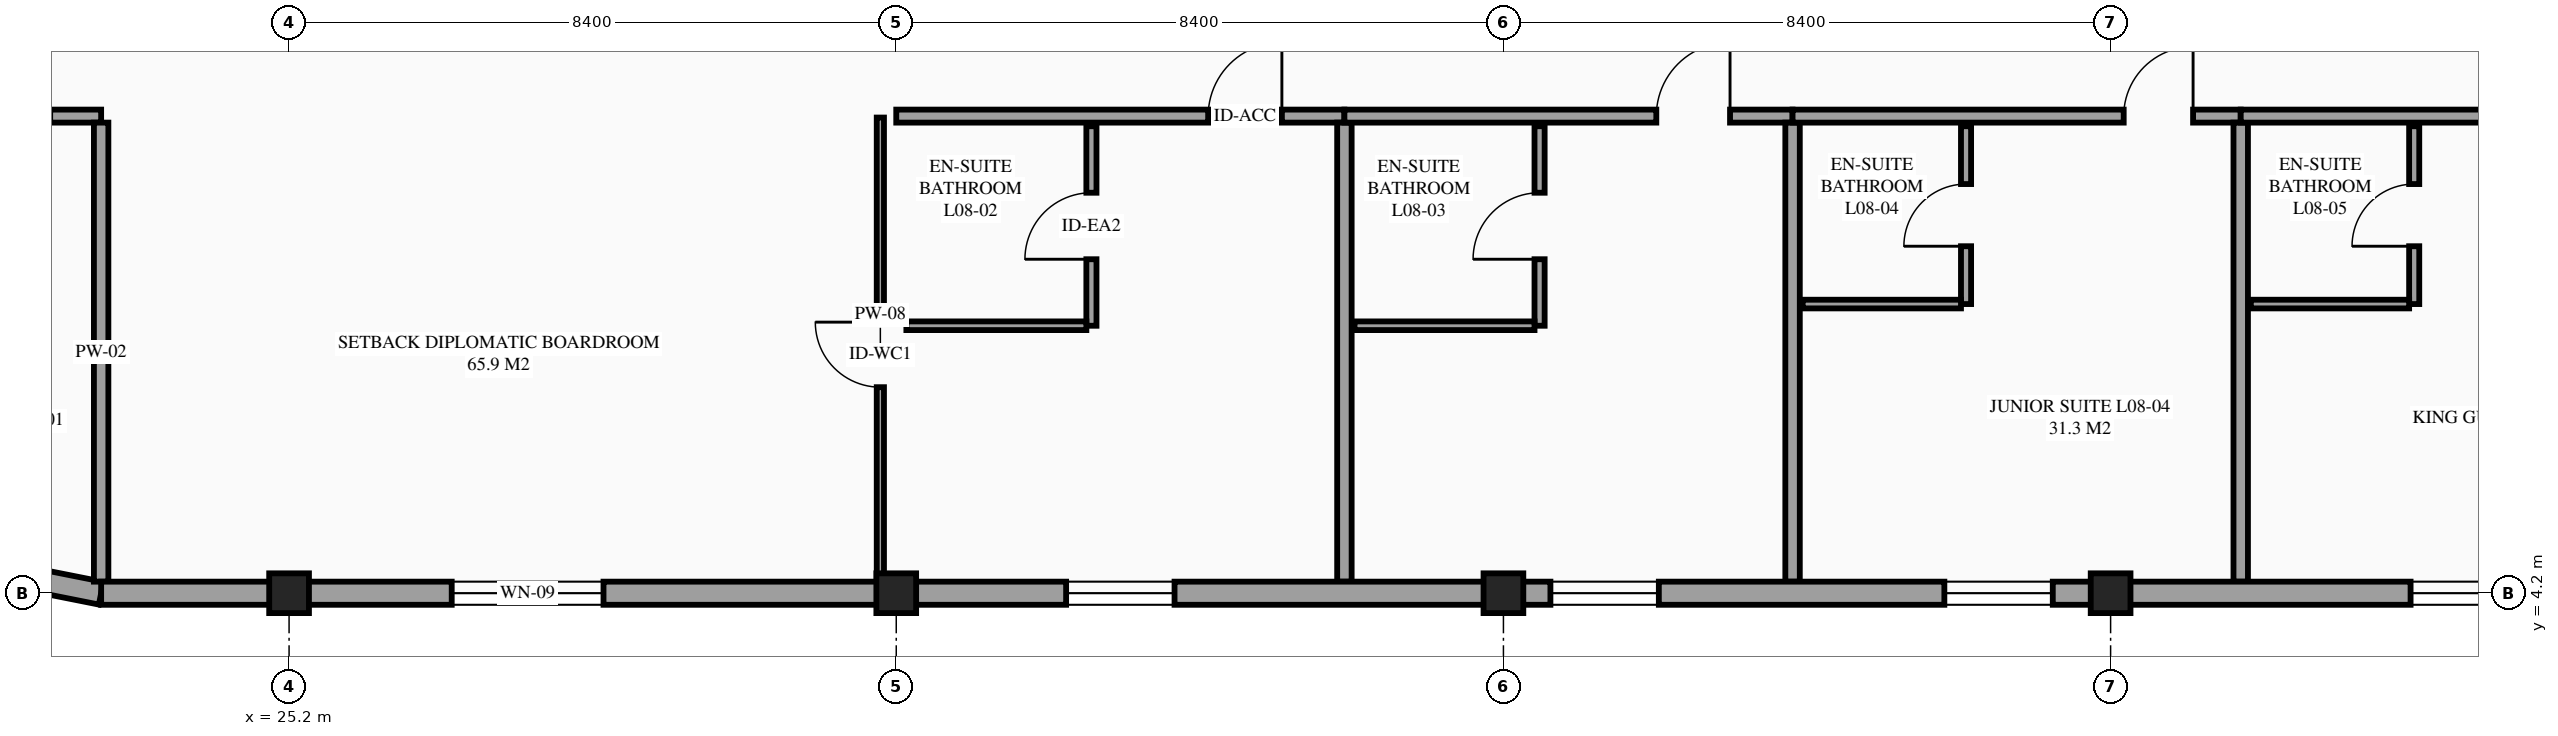
"""IFC4 building model, lengths in metres.
Left out: names, types, materials, properties, quantities, classifications, styles, units other than length and angle.
Written with IfcOpenShell. Run it as: python <this file> out.ifc"""

import sys

from ifc_helpers import new_model, si_unit, direction, frame, frame_2d, origin, origin_2d, place, context, subcontext, project, spatial, rectangle, extrude, element, fill, save


model = new_model("IFC4")
c1 = context("Model", 3, precision=1e-05, world=origin(), true_north=direction((0.0, 1.0)))
c2 = subcontext(c1, "Body", "Model", "MODEL_VIEW")
j1 = project(units=[si_unit("LENGTHUNIT", "METRE"), si_unit("PLANEANGLEUNIT", "RADIAN")], contexts=[c1])
p1 = place(None, origin())
s1 = spatial("IfcSite", under=j1, at=p1, CompositionType="ELEMENT")
p2 = place(p1, origin())
s2 = spatial("IfcBuilding", under=s1, at=p2, CompositionType="ELEMENT")
p3 = place(p2, frame((0.0, 0.0, 32.7)))
s3 = spatial("IfcBuildingStorey", under=s2, at=p3, CompositionType="ELEMENT", Elevation=32.7)
for number, where, z_axis, x_axis in (
    (1, (25.2, 4.2, 0.0), (0.0, 0.0, 1.0), (1.0, 0.0, 0.0)),
    (2, (33.6, 4.2, 0.0), (0.0, 0.0, 1.0), (1.0, 0.0, 0.0)),
    (3, (42.0, 4.2, 0.0), (0.0, 0.0, 1.0), (1.0, 0.0, 0.0)),
    (4, (50.4, 4.2, 0.0), (0.0, 0.0, 1.0), (1.0, 0.0, 0.0)),
):
    element("IfcColumn", number, at=place(p3, frame(where, z_axis=z_axis, x_axis=x_axis)), inside=s3, PredefinedType="COLUMN", context=c2, shape_type="SweptSolid", body=[
        extrude(rectangle(XDim=0.55, YDim=0.55, at=origin_2d()), origin(), (0.0, 0.0, 1.0), 3.6),
    ])
p4 = place(p3, frame((20.38, 4.642, 0.0), z_axis=(0.0, 0.0, 1.0), x_axis=(0.98077519094, -0.195141038321, 0.0)))
e5 = element("IfcWall", 5, at=p4, inside=s3, PredefinedType="STANDARD", context=c2, shape_type="SweptSolid", body=[
    extrude(rectangle(XDim=2.263, YDim=0.32, at=frame_2d((1.132, 0.0))), origin(), (0.0, 0.0, 1.0), 2.88),
])
p5 = place(p3, frame((16.96, 10.8, 0.0), z_axis=(0.0, 0.0, 1.0), x_axis=(1.0, 0.0, 0.0)))
e6 = element("IfcWall", 6, at=p5, inside=s3, PredefinedType="PARTITIONING", context=c2, shape_type="SweptSolid", body=[
    extrude(rectangle(XDim=5.64, YDim=0.18, at=frame_2d((2.82, 0.0))), origin(), (0.0, 0.0, 1.0), 3.375),
])
p6 = place(p5, frame((3.975, 0.0, 0.0)))
e7 = element("IfcOpeningElement", 7, at=p6, cuts=e6, PredefinedType="OPENING", context=c2, shape_type="SweptSolid", body=[
    extrude(rectangle(XDim=0.96, YDim=2.15, at=frame_2d((0.48, 1.075))), frame((0.0, 0.1, 0.0), z_axis=(0.0, -1.0, 0.0), x_axis=(1.0, 0.0, 0.0)), (0.0, 0.0, 1.0), 0.2),
])
p7 = place(p3, frame((22.6, 4.36, 0.0), z_axis=(0.0, 0.0, 1.0), x_axis=(0.0, 1.0, 0.0)))
e8 = element("IfcWall", 8, at=p7, inside=s3, PredefinedType="PARTITIONING", context=c2, shape_type="SweptSolid", body=[
    extrude(rectangle(XDim=6.35, YDim=0.2, at=frame_2d((3.175, 0.0))), origin(), (0.0, 0.0, 1.0), 3.375),
])
p8 = place(p3, frame((33.6, 10.8, 0.0), z_axis=(0.0, 0.0, 1.0), x_axis=(1.0, 0.0, 0.0)))
e9 = element("IfcWall", 9, at=p8, inside=s3, PredefinedType="PARTITIONING", context=c2, shape_type="SweptSolid", body=[
    extrude(rectangle(XDim=6.2, YDim=0.18, at=frame_2d((3.1, 0.0))), origin(), (0.0, 0.0, 1.0), 3.375),
])
p9 = place(p8, frame((4.315, 0.0, 0.0)))
e10 = element("IfcOpeningElement", 10, at=p9, cuts=e9, PredefinedType="OPENING", context=c2, shape_type="SweptSolid", body=[
    extrude(rectangle(XDim=1.02, YDim=2.15, at=frame_2d((0.51, 1.075))), frame((0.0, 0.1, 0.0), z_axis=(0.0, -1.0, 0.0), x_axis=(1.0, 0.0, 0.0)), (0.0, 0.0, 1.0), 0.2),
])
p10 = place(p3, frame((39.8, 4.36, 0.0), z_axis=(0.0, 0.0, 1.0), x_axis=(0.0, 1.0, 0.0)))
e11 = element("IfcWall", 11, at=p10, inside=s3, PredefinedType="PARTITIONING", context=c2, shape_type="SweptSolid", body=[
    extrude(rectangle(XDim=6.35, YDim=0.2, at=frame_2d((3.175, 0.0))), origin(), (0.0, 0.0, 1.0), 3.375),
])
p11 = place(p3, frame((36.3, 7.9, 0.0), z_axis=(0.0, 0.0, 1.0), x_axis=(0.0, 1.0, 0.0)))
e12 = element("IfcWall", 12, at=p11, inside=s3, PredefinedType="PARTITIONING", context=c2, shape_type="SweptSolid", body=[
    extrude(rectangle(XDim=2.76, YDim=0.14, at=frame_2d((1.38, 0.0))), origin(), (0.0, 0.0, 1.0), 3.375),
])
p12 = place(p11, frame((0.92, 0.0, 0.0)))
e13 = element("IfcOpeningElement", 13, at=p12, cuts=e12, PredefinedType="OPENING", context=c2, shape_type="SweptSolid", body=[
    extrude(rectangle(XDim=0.92, YDim=2.1, at=frame_2d((0.46, 1.05))), frame((0.0, 0.08, 0.0), z_axis=(0.0, -1.0, 0.0), x_axis=(1.0, 0.0, 0.0)), (0.0, 0.0, 1.0), 0.16),
])
p13 = place(p3, frame((33.74, 7.9, 0.0), z_axis=(0.0, 0.0, 1.0), x_axis=(1.0, 0.0, 0.0)))
e14 = element("IfcWall", 14, at=p13, inside=s3, PredefinedType="PARTITIONING", context=c2, shape_type="SweptSolid", body=[
    extrude(rectangle(XDim=2.49, YDim=0.12, at=frame_2d((1.245, 0.0))), origin(), (0.0, 0.0, 1.0), 3.375),
])
p14 = place(p3, frame((39.8, 10.8, 0.0), z_axis=(0.0, 0.0, 1.0), x_axis=(1.0, 0.0, 0.0)))
e15 = element("IfcWall", 15, at=p14, inside=s3, PredefinedType="PARTITIONING", context=c2, shape_type="SweptSolid", body=[
    extrude(rectangle(XDim=6.2, YDim=0.18, at=frame_2d((3.1, 0.0))), origin(), (0.0, 0.0, 1.0), 3.375),
])
p15 = place(p14, frame((4.315, 0.0, 0.0)))
e16 = element("IfcOpeningElement", 16, at=p15, cuts=e15, PredefinedType="OPENING", context=c2, shape_type="SweptSolid", body=[
    extrude(rectangle(XDim=1.02, YDim=2.15, at=frame_2d((0.51, 1.075))), frame((0.0, 0.1, 0.0), z_axis=(0.0, -1.0, 0.0), x_axis=(1.0, 0.0, 0.0)), (0.0, 0.0, 1.0), 0.2),
])
p16 = place(p3, frame((46.0, 4.36, 0.0), z_axis=(0.0, 0.0, 1.0), x_axis=(0.0, 1.0, 0.0)))
e17 = element("IfcWall", 17, at=p16, inside=s3, PredefinedType="PARTITIONING", context=c2, shape_type="SweptSolid", body=[
    extrude(rectangle(XDim=6.35, YDim=0.2, at=frame_2d((3.175, 0.0))), origin(), (0.0, 0.0, 1.0), 3.375),
])
p17 = place(p3, frame((42.5, 7.9, 0.0), z_axis=(0.0, 0.0, 1.0), x_axis=(0.0, 1.0, 0.0)))
e18 = element("IfcWall", 18, at=p17, inside=s3, PredefinedType="PARTITIONING", context=c2, shape_type="SweptSolid", body=[
    extrude(rectangle(XDim=2.76, YDim=0.14, at=frame_2d((1.38, 0.0))), origin(), (0.0, 0.0, 1.0), 3.375),
])
p18 = place(p17, frame((0.92, 0.0, 0.0)))
e19 = element("IfcOpeningElement", 19, at=p18, cuts=e18, PredefinedType="OPENING", context=c2, shape_type="SweptSolid", body=[
    extrude(rectangle(XDim=0.92, YDim=2.1, at=frame_2d((0.46, 1.05))), frame((0.0, 0.08, 0.0), z_axis=(0.0, -1.0, 0.0), x_axis=(1.0, 0.0, 0.0)), (0.0, 0.0, 1.0), 0.16),
])
p19 = place(p3, frame((39.94, 7.9, 0.0), z_axis=(0.0, 0.0, 1.0), x_axis=(1.0, 0.0, 0.0)))
e20 = element("IfcWall", 20, at=p19, inside=s3, PredefinedType="PARTITIONING", context=c2, shape_type="SweptSolid", body=[
    extrude(rectangle(XDim=2.49, YDim=0.12, at=frame_2d((1.245, 0.0))), origin(), (0.0, 0.0, 1.0), 3.375),
])
p20 = place(p3, frame((46.0, 10.8, 0.0), z_axis=(0.0, 0.0, 1.0), x_axis=(1.0, 0.0, 0.0)))
e21 = element("IfcWall", 21, at=p20, inside=s3, PredefinedType="PARTITIONING", context=c2, shape_type="SweptSolid", body=[
    extrude(rectangle(XDim=6.2, YDim=0.18, at=frame_2d((3.1, 0.0))), origin(), (0.0, 0.0, 1.0), 3.375),
])
p21 = place(p20, frame((4.581, 0.0, 0.0)))
e22 = element("IfcOpeningElement", 22, at=p21, cuts=e21, PredefinedType="OPENING", context=c2, shape_type="SweptSolid", body=[
    extrude(rectangle(XDim=0.96, YDim=2.15, at=frame_2d((0.48, 1.075))), frame((0.0, 0.1, 0.0), z_axis=(0.0, -1.0, 0.0), x_axis=(1.0, 0.0, 0.0)), (0.0, 0.0, 1.0), 0.2),
])
p22 = place(p3, frame((52.2, 4.36, 0.0), z_axis=(0.0, 0.0, 1.0), x_axis=(0.0, 1.0, 0.0)))
e23 = element("IfcWall", 23, at=p22, inside=s3, PredefinedType="PARTITIONING", context=c2, shape_type="SweptSolid", body=[
    extrude(rectangle(XDim=6.35, YDim=0.2, at=frame_2d((3.175, 0.0))), origin(), (0.0, 0.0, 1.0), 3.375),
])
p23 = place(p3, frame((48.4, 8.2, 0.0), z_axis=(0.0, 0.0, 1.0), x_axis=(0.0, 1.0, 0.0)))
e24 = element("IfcWall", 24, at=p23, inside=s3, PredefinedType="PARTITIONING", context=c2, shape_type="SweptSolid", body=[
    extrude(rectangle(XDim=2.46, YDim=0.14, at=frame_2d((1.23, 0.0))), origin(), (0.0, 0.0, 1.0), 3.375),
])
p24 = place(p23, frame((0.8, 0.0, 0.0)))
e25 = element("IfcOpeningElement", 25, at=p24, cuts=e24, PredefinedType="OPENING", context=c2, shape_type="SweptSolid", body=[
    extrude(rectangle(XDim=0.86, YDim=2.1, at=frame_2d((0.43, 1.05))), frame((0.0, 0.08, 0.0), z_axis=(0.0, -1.0, 0.0), x_axis=(1.0, 0.0, 0.0)), (0.0, 0.0, 1.0), 0.16),
])
p25 = place(p3, frame((46.14, 8.2, 0.0), z_axis=(0.0, 0.0, 1.0), x_axis=(1.0, 0.0, 0.0)))
e26 = element("IfcWall", 26, at=p25, inside=s3, PredefinedType="PARTITIONING", context=c2, shape_type="SweptSolid", body=[
    extrude(rectangle(XDim=2.19, YDim=0.12, at=frame_2d((1.095, 0.0))), origin(), (0.0, 0.0, 1.0), 3.375),
])
p26 = place(p3, frame((52.2, 10.8, 0.0), z_axis=(0.0, 0.0, 1.0), x_axis=(1.0, 0.0, 0.0)))
e27 = element("IfcWall", 27, at=p26, inside=s3, PredefinedType="PARTITIONING", context=c2, shape_type="SweptSolid", body=[
    extrude(rectangle(XDim=6.2, YDim=0.18, at=frame_2d((3.1, 0.0))), origin(), (0.0, 0.0, 1.0), 3.375),
])
p27 = place(p26, frame((4.231, 0.0, 0.0)))
e28 = element("IfcOpeningElement", 28, at=p27, cuts=e27, PredefinedType="OPENING", context=c2, shape_type="SweptSolid", body=[
    extrude(rectangle(XDim=0.96, YDim=2.15, at=frame_2d((0.48, 1.075))), frame((0.0, 0.1, 0.0), z_axis=(0.0, -1.0, 0.0), x_axis=(1.0, 0.0, 0.0)), (0.0, 0.0, 1.0), 0.2),
])
p28 = place(p3, frame((54.6, 8.2, 0.0), z_axis=(0.0, 0.0, 1.0), x_axis=(0.0, 1.0, 0.0)))
e29 = element("IfcWall", 29, at=p28, inside=s3, PredefinedType="PARTITIONING", context=c2, shape_type="SweptSolid", body=[
    extrude(rectangle(XDim=2.46, YDim=0.14, at=frame_2d((1.23, 0.0))), origin(), (0.0, 0.0, 1.0), 3.375),
])
p29 = place(p28, frame((0.8, 0.0, 0.0)))
e30 = element("IfcOpeningElement", 30, at=p29, cuts=e29, PredefinedType="OPENING", context=c2, shape_type="SweptSolid", body=[
    extrude(rectangle(XDim=0.86, YDim=2.1, at=frame_2d((0.43, 1.05))), frame((0.0, 0.08, 0.0), z_axis=(0.0, -1.0, 0.0), x_axis=(1.0, 0.0, 0.0)), (0.0, 0.0, 1.0), 0.16),
])
p30 = place(p3, frame((52.34, 8.2, 0.0), z_axis=(0.0, 0.0, 1.0), x_axis=(1.0, 0.0, 0.0)))
e31 = element("IfcWall", 31, at=p30, inside=s3, PredefinedType="PARTITIONING", context=c2, shape_type="SweptSolid", body=[
    extrude(rectangle(XDim=2.19, YDim=0.12, at=frame_2d((1.095, 0.0))), origin(), (0.0, 0.0, 1.0), 3.375),
])
p31 = place(p3, frame((33.38, 4.22, 0.0), z_axis=(0.0, 0.0, 1.0), x_axis=(0.0, 1.0, 0.0)))
e32 = element("IfcWall", 32, at=p31, inside=s3, PredefinedType="PARTITIONING", context=c2, shape_type="SweptSolid", body=[
    extrude(rectangle(XDim=6.56, YDim=0.1, at=frame_2d((3.28, 0.0))), origin(), (0.0, 0.0, 1.0), 2.58),
])
p32 = place(p31, frame((2.83, 0.0, 0.0)))
e33 = element("IfcOpeningElement", 33, at=p32, cuts=e32, PredefinedType="OPENING", context=c2, shape_type="SweptSolid", body=[
    extrude(rectangle(XDim=0.9, YDim=2.12, at=frame_2d((0.45, 1.06))), frame((0.0, 0.06, 0.0), z_axis=(0.0, -1.0, 0.0), x_axis=(1.0, 0.0, 0.0)), (0.0, 0.0, 1.0), 0.12),
])
p33 = place(p3, frame((22.6, 4.2, 0.0), z_axis=(0.0, 0.0, 1.0), x_axis=(1.0, 0.0, 0.0)))
e34 = element("IfcWall", 34, at=p33, inside=s3, PredefinedType="STANDARD", context=c2, shape_type="SweptSolid", body=[
    extrude(rectangle(XDim=2.6, YDim=0.32, at=frame_2d((1.3, 0.0))), origin(), (0.0, 0.0, 1.0), 2.88),
])
p34 = place(p3, frame((25.2, 4.2, 0.0), z_axis=(0.0, 0.0, 1.0), x_axis=(1.0, 0.0, 0.0)))
e35 = element("IfcWall", 35, at=p34, inside=s3, PredefinedType="STANDARD", context=c2, shape_type="SweptSolid", body=[
    extrude(rectangle(XDim=8.4, YDim=0.32, at=frame_2d((4.2, 0.0))), origin(), (0.0, 0.0, 1.0), 2.63),
])
p35 = place(p34, frame((2.25, 0.0, 0.75)))
e36 = element("IfcOpeningElement", 36, at=p35, cuts=e35, PredefinedType="OPENING", context=c2, shape_type="SweptSolid", body=[
    extrude(rectangle(XDim=2.1, YDim=1.5, at=frame_2d((1.05, 0.75))), frame((0.0, 0.17, 0.0), z_axis=(0.0, -1.0, 0.0), x_axis=(1.0, 0.0, 0.0)), (0.0, 0.0, 1.0), 0.34),
])
p36 = place(p3, frame((33.6, 4.2, 0.0), z_axis=(0.0, 0.0, 1.0), x_axis=(1.0, 0.0, 0.0)))
e37 = element("IfcWall", 37, at=p36, inside=s3, PredefinedType="STANDARD", context=c2, shape_type="SweptSolid", body=[
    extrude(rectangle(XDim=8.4, YDim=0.32, at=frame_2d((4.2, 0.0))), origin(), (0.0, 0.0, 1.0), 2.73),
])
p37 = place(p36, frame((2.35, 0.0, 0.85)))
e38 = element("IfcOpeningElement", 38, at=p37, cuts=e37, PredefinedType="OPENING", context=c2, shape_type="SweptSolid", body=[
    extrude(rectangle(XDim=1.5, YDim=1.5, at=frame_2d((0.75, 0.75))), frame((0.0, 0.17, 0.0), z_axis=(0.0, -1.0, 0.0), x_axis=(1.0, 0.0, 0.0)), (0.0, 0.0, 1.0), 0.34),
])
p38 = place(p3, frame((42.0, 4.2, 0.0), z_axis=(0.0, 0.0, 1.0), x_axis=(1.0, 0.0, 0.0)))
e39 = element("IfcWall", 39, at=p38, inside=s3, PredefinedType="STANDARD", context=c2, shape_type="SweptSolid", body=[
    extrude(rectangle(XDim=8.4, YDim=0.32, at=frame_2d((4.2, 0.0))), origin(), (0.0, 0.0, 1.0), 3.075),
])
p39 = place(p38, frame((0.65, 0.0, 0.85)))
e40 = element("IfcOpeningElement", 40, at=p39, cuts=e39, PredefinedType="OPENING", context=c2, shape_type="SweptSolid", body=[
    extrude(rectangle(XDim=1.5, YDim=1.5, at=frame_2d((0.75, 0.75))), frame((0.0, 0.17, 0.0), z_axis=(0.0, -1.0, 0.0), x_axis=(1.0, 0.0, 0.0)), (0.0, 0.0, 1.0), 0.34),
])
p40 = place(p38, frame((6.1, 0.0, 0.85)))
e41 = element("IfcOpeningElement", 41, at=p40, cuts=e39, PredefinedType="OPENING", context=c2, shape_type="SweptSolid", body=[
    extrude(rectangle(XDim=1.5, YDim=1.5, at=frame_2d((0.75, 0.75))), frame((0.0, 0.17, 0.0), z_axis=(0.0, -1.0, 0.0), x_axis=(1.0, 0.0, 0.0)), (0.0, 0.0, 1.0), 0.34),
])
p41 = place(p3, frame((50.4, 4.2, 0.0), z_axis=(0.0, 0.0, 1.0), x_axis=(1.0, 0.0, 0.0)))
e42 = element("IfcWall", 42, at=p41, inside=s3, PredefinedType="STANDARD", context=c2, shape_type="SweptSolid", body=[
    extrude(rectangle(XDim=8.4, YDim=0.32, at=frame_2d((4.2, 0.0))), origin(), (0.0, 0.0, 1.0), 2.78),
])
p42 = place(p41, frame((4.15, 0.0, 0.85)))
e43 = element("IfcOpeningElement", 43, at=p42, cuts=e42, PredefinedType="OPENING", context=c2, shape_type="SweptSolid", body=[
    extrude(rectangle(XDim=1.5, YDim=1.5, at=frame_2d((0.75, 0.75))), frame((0.0, 0.17, 0.0), z_axis=(0.0, -1.0, 0.0), x_axis=(1.0, 0.0, 0.0)), (0.0, 0.0, 1.0), 0.34),
])
p43 = place(p37, origin())
e44 = element("IfcWindow", 44, at=p43, inside=s3, PartitioningType="SINGLE_PANEL", PredefinedType="WINDOW", context=c2, shape_type="SweptSolid", body=[
    extrude(rectangle(XDim=1.5, YDim=1.5, at=frame_2d((0.75, 0.75))), frame((0.0, 0.03, 0.0), z_axis=(0.0, -1.0, 0.0), x_axis=(1.0, 0.0, 0.0)), (0.0, 0.0, 1.0), 0.06),
])
fill(e38, e44)
p44 = place(p39, origin())
e45 = element("IfcWindow", 45, at=p44, inside=s3, PartitioningType="SINGLE_PANEL", PredefinedType="WINDOW", context=c2, shape_type="SweptSolid", body=[
    extrude(rectangle(XDim=1.5, YDim=1.5, at=frame_2d((0.75, 0.75))), frame((0.0, 0.03, 0.0), z_axis=(0.0, -1.0, 0.0), x_axis=(1.0, 0.0, 0.0)), (0.0, 0.0, 1.0), 0.06),
])
fill(e40, e45)
p45 = place(p40, origin())
e46 = element("IfcWindow", 46, at=p45, inside=s3, PartitioningType="SINGLE_PANEL", PredefinedType="WINDOW", context=c2, shape_type="SweptSolid", body=[
    extrude(rectangle(XDim=1.5, YDim=1.5, at=frame_2d((0.75, 0.75))), frame((0.0, 0.03, 0.0), z_axis=(0.0, -1.0, 0.0), x_axis=(1.0, 0.0, 0.0)), (0.0, 0.0, 1.0), 0.06),
])
fill(e41, e46)
p46 = place(p42, origin())
e47 = element("IfcWindow", 47, at=p46, inside=s3, PartitioningType="SINGLE_PANEL", PredefinedType="WINDOW", context=c2, shape_type="SweptSolid", body=[
    extrude(rectangle(XDim=1.5, YDim=1.5, at=frame_2d((0.75, 0.75))), frame((0.0, 0.03, 0.0), z_axis=(0.0, -1.0, 0.0), x_axis=(1.0, 0.0, 0.0)), (0.0, 0.0, 1.0), 0.06),
])
fill(e43, e47)
p47 = place(p35, origin())
e48 = element("IfcWindow", 48, at=p47, inside=s3, PartitioningType="SINGLE_PANEL", PredefinedType="WINDOW", context=c2, shape_type="SweptSolid", body=[
    extrude(rectangle(XDim=2.1, YDim=1.5, at=frame_2d((1.05, 0.75))), frame((0.0, 0.03, 0.0), z_axis=(0.0, -1.0, 0.0), x_axis=(1.0, 0.0, 0.0)), (0.0, 0.0, 1.0), 0.06),
])
fill(e36, e48)
p48 = place(p9, origin())
e49 = element("IfcDoor", 49, at=p48, inside=s3, OperationType="SINGLE_SWING_RIGHT", PredefinedType="DOOR", context=c2, shape_type="SweptSolid", body=[
    extrude(rectangle(XDim=1.02, YDim=2.15, at=frame_2d((0.51, 1.075))), frame((0.0, 0.025, 0.0), z_axis=(0.0, -1.0, 0.0), x_axis=(1.0, 0.0, 0.0)), (0.0, 0.0, 1.0), 0.05),
])
fill(e10, e49)
p49 = place(p12, origin())
e50 = element("IfcDoor", 50, at=p49, inside=s3, OperationType="SINGLE_SWING_LEFT", PredefinedType="DOOR", context=c2, shape_type="SweptSolid", body=[
    extrude(rectangle(XDim=0.92, YDim=2.1, at=frame_2d((0.46, 1.05))), frame((0.0, 0.025, 0.0), z_axis=(0.0, -1.0, 0.0), x_axis=(1.0, 0.0, 0.0)), (0.0, 0.0, 1.0), 0.05),
])
fill(e13, e50)
p50 = place(p15, origin())
e51 = element("IfcDoor", 51, at=p50, inside=s3, OperationType="SINGLE_SWING_RIGHT", PredefinedType="DOOR", context=c2, shape_type="SweptSolid", body=[
    extrude(rectangle(XDim=1.02, YDim=2.15, at=frame_2d((0.51, 1.075))), frame((0.0, 0.025, 0.0), z_axis=(0.0, -1.0, 0.0), x_axis=(1.0, 0.0, 0.0)), (0.0, 0.0, 1.0), 0.05),
])
fill(e16, e51)
p51 = place(p18, origin())
e52 = element("IfcDoor", 52, at=p51, inside=s3, OperationType="SINGLE_SWING_LEFT", PredefinedType="DOOR", context=c2, shape_type="SweptSolid", body=[
    extrude(rectangle(XDim=0.92, YDim=2.1, at=frame_2d((0.46, 1.05))), frame((0.0, 0.025, 0.0), z_axis=(0.0, -1.0, 0.0), x_axis=(1.0, 0.0, 0.0)), (0.0, 0.0, 1.0), 0.05),
])
fill(e19, e52)
p52 = place(p21, origin())
e53 = element("IfcDoor", 53, at=p52, inside=s3, OperationType="SINGLE_SWING_RIGHT", PredefinedType="DOOR", context=c2, shape_type="SweptSolid", body=[
    extrude(rectangle(XDim=0.96, YDim=2.15, at=frame_2d((0.48, 1.075))), frame((0.0, 0.025, 0.0), z_axis=(0.0, -1.0, 0.0), x_axis=(1.0, 0.0, 0.0)), (0.0, 0.0, 1.0), 0.05),
])
fill(e22, e53)
p53 = place(p24, origin())
e54 = element("IfcDoor", 54, at=p53, inside=s3, OperationType="SINGLE_SWING_LEFT", PredefinedType="DOOR", context=c2, shape_type="SweptSolid", body=[
    extrude(rectangle(XDim=0.86, YDim=2.1, at=frame_2d((0.43, 1.05))), frame((0.0, 0.025, 0.0), z_axis=(0.0, -1.0, 0.0), x_axis=(1.0, 0.0, 0.0)), (0.0, 0.0, 1.0), 0.05),
])
fill(e25, e54)
p54 = place(p29, origin())
e55 = element("IfcDoor", 55, at=p54, inside=s3, OperationType="SINGLE_SWING_LEFT", PredefinedType="DOOR", context=c2, shape_type="SweptSolid", body=[
    extrude(rectangle(XDim=0.86, YDim=2.1, at=frame_2d((0.43, 1.05))), frame((0.0, 0.025, 0.0), z_axis=(0.0, -1.0, 0.0), x_axis=(1.0, 0.0, 0.0)), (0.0, 0.0, 1.0), 0.05),
])
fill(e30, e55)
p55 = place(p32, origin())
e56 = element("IfcDoor", 56, at=p55, inside=s3, OperationType="SINGLE_SWING_RIGHT", PredefinedType="DOOR", context=c2, shape_type="SweptSolid", body=[
    extrude(rectangle(XDim=0.9, YDim=2.12, at=frame_2d((0.45, 1.06))), frame((0.0, 0.025, 0.0), z_axis=(0.0, -1.0, 0.0), x_axis=(1.0, 0.0, 0.0)), (0.0, 0.0, 1.0), 0.05),
])
fill(e33, e56)
save(model, sys.argv[1])
